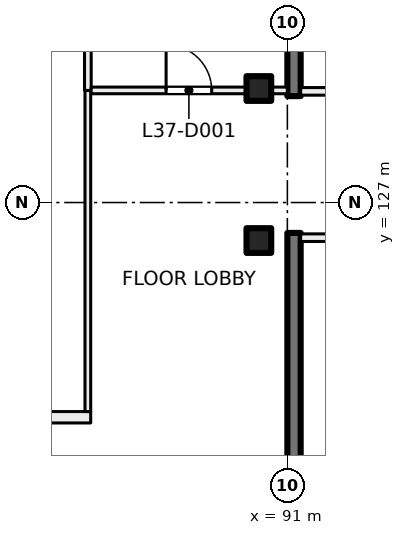
"""IFC4 building model, lengths in metres.
Left out: names, types, materials, properties, quantities, classifications, styles, units other than length and angle.
Written with IfcOpenShell. Run it as: python <this file> out.ifc"""

import sys

from ifc_helpers import new_model, si_unit, direction, frame, frame_2d, origin, origin_2d, place, context, subcontext, project, spatial, rectangle, extrude, element, fill, save


model = new_model("IFC4")
c1 = context("Model", 3, precision=1e-05, world=origin(), true_north=direction((0.0, 1.0)))
c2 = subcontext(c1, "Body", "Model", "MODEL_VIEW")
j1 = project(units=[si_unit("LENGTHUNIT", "METRE"), si_unit("PLANEANGLEUNIT", "RADIAN")], contexts=[c1])
p1 = place(None, origin())
s1 = spatial("IfcSite", under=j1, at=p1, CompositionType="ELEMENT")
p2 = place(p1, origin())
s2 = spatial("IfcBuilding", under=s1, at=p2, CompositionType="ELEMENT")
p3 = place(p2, frame((0.0, 0.0, 158.5)))
s3 = spatial("IfcBuildingStorey", under=s2, at=p3, CompositionType="ELEMENT", Elevation=158.5)
for number, where, z_axis, x_axis in (
    (1, (90.25, 130.0, 0.0), (0.0, 0.0, 1.0), (1.0, 0.0, 0.0)),
    (2, (90.25, 126.0, 0.0), (0.0, 0.0, 1.0), (1.0, 0.0, 0.0)),
):
    element("IfcColumn", number, at=place(p3, frame(where, z_axis=z_axis, x_axis=x_axis)), inside=s3, PredefinedType="COLUMN", context=c2, shape_type="SweptSolid", body=[
        extrude(rectangle(XDim=0.65, YDim=0.65, at=origin_2d()), origin(), (0.0, 0.0, 1.0), 4.0),
    ])
for number, where, z_axis, x_axis in (
    (3, (91.175, 138.45, 0.0), (0.0, 0.0, 1.0), (0.0, -1.0, 0.0)),
    (4, (91.175, 126.2, 0.0), (0.0, 0.0, 1.0), (0.0, -1.0, 0.0)),
):
    element("IfcWall", number, at=place(p3, frame(where, z_axis=z_axis, x_axis=x_axis)), inside=s3, PredefinedType="SHEAR", context=c2, shape_type="SweptSolid", body=[
        extrude(rectangle(XDim=8.65, YDim=0.35, at=frame_2d((4.325, 0.0))), origin(), (0.0, 0.0, 1.0), 4.0),
    ])
p4 = place(p3, frame((95.225, 126.075, 0.0), z_axis=(0.0, 0.0, 1.0), x_axis=(-1.0, 0.0, 0.0)))
e5 = element("IfcWall", 5, at=p4, inside=s3, PredefinedType="PARTITIONING", context=c2, shape_type="SweptSolid", body=[
    extrude(rectangle(XDim=3.875, YDim=0.2, at=frame_2d((1.938, 0.0))), origin(), (0.0, 0.0, 1.0), 3.625),
])
p5 = place(p4, frame((0.3, 0.0, 0.0)))
e6 = element("IfcOpeningElement", 6, at=p5, cuts=e5, PredefinedType="OPENING", context=c2, shape_type="SweptSolid", body=[
    extrude(rectangle(XDim=1.2, YDim=2.1, at=frame_2d((0.6, 1.05))), frame((0.0, 0.11, 0.0), z_axis=(0.0, -1.0, 0.0), x_axis=(1.0, 0.0, 0.0)), (0.0, 0.0, 1.0), 0.22),
])
p6 = place(p3, frame((91.35, 129.925, 0.0), z_axis=(0.0, 0.0, 1.0), x_axis=(1.0, 0.0, 0.0)))
e7 = element("IfcWall", 7, at=p6, inside=s3, PredefinedType="PARTITIONING", context=c2, shape_type="SweptSolid", body=[
    extrude(rectangle(XDim=3.875, YDim=0.2, at=frame_2d((1.938, 0.0))), origin(), (0.0, 0.0, 1.0), 3.625),
])
p7 = place(p6, frame((2.375, 0.0, 0.0)))
e8 = element("IfcOpeningElement", 8, at=p7, cuts=e7, PredefinedType="OPENING", context=c2, shape_type="SweptSolid", body=[
    extrude(rectangle(XDim=1.2, YDim=2.1, at=frame_2d((0.6, 1.05))), frame((0.0, 0.11, 0.0), z_axis=(0.0, -1.0, 0.0), x_axis=(1.0, 0.0, 0.0)), (0.0, 0.0, 1.0), 0.22),
])
p8 = place(p3, frame((50.506, 121.35, 0.0), z_axis=(0.0, 0.0, 1.0), x_axis=(1.0, 0.0, 0.0)))
e9 = element("IfcWall", 9, at=p8, inside=s3, PredefinedType="PARTITIONING", context=c2, shape_type="SweptSolid", body=[
    extrude(rectangle(XDim=35.319, YDim=0.3, at=frame_2d((17.659, 0.0))), origin(), (0.0, 0.0, 1.0), 3.625),
])
p9 = place(p8, frame((25.744, 0.0, 0.0)))
e10 = element("IfcOpeningElement", 10, at=p9, cuts=e9, PredefinedType="OPENING", context=c2, shape_type="SweptSolid", body=[
    extrude(rectangle(XDim=1.0, YDim=2.1, at=frame_2d((0.5, 1.05))), frame((0.0, 0.16, 0.0), z_axis=(0.0, -1.0, 0.0), x_axis=(1.0, 0.0, 0.0)), (0.0, 0.0, 1.0), 0.32),
])
p10 = place(p8, frame((32.094, 0.0, 0.0)))
e11 = element("IfcOpeningElement", 11, at=p10, cuts=e9, PredefinedType="OPENING", context=c2, shape_type="SweptSolid", body=[
    extrude(rectangle(XDim=1.8, YDim=2.1, at=frame_2d((0.9, 1.05))), frame((0.0, 0.16, 0.0), z_axis=(0.0, -1.0, 0.0), x_axis=(1.0, 0.0, 0.0)), (0.0, 0.0, 1.0), 0.32),
])
p11 = place(p8, frame((13.844, 0.0, 0.0)))
e12 = element("IfcOpeningElement", 12, at=p11, cuts=e9, PredefinedType="OPENING", context=c2, shape_type="SweptSolid", body=[
    extrude(rectangle(XDim=0.8, YDim=2.1, at=frame_2d((0.4, 1.05))), frame((0.0, 0.16, 0.0), z_axis=(0.0, -1.0, 0.0), x_axis=(1.0, 0.0, 0.0)), (0.0, 0.0, 1.0), 0.32),
])
p12 = place(p8, frame((9.144, 0.0, 0.0)))
e13 = element("IfcOpeningElement", 13, at=p12, cuts=e9, PredefinedType="OPENING", context=c2, shape_type="SweptSolid", body=[
    extrude(rectangle(XDim=1.2, YDim=2.1, at=frame_2d((0.6, 1.05))), frame((0.0, 0.16, 0.0), z_axis=(0.0, -1.0, 0.0), x_axis=(1.0, 0.0, 0.0)), (0.0, 0.0, 1.0), 0.32),
])
p13 = place(p8, frame((17.844, 0.0, 0.0)))
e14 = element("IfcOpeningElement", 14, at=p13, cuts=e9, PredefinedType="OPENING", context=c2, shape_type="SweptSolid", body=[
    extrude(rectangle(XDim=1.8, YDim=2.1, at=frame_2d((0.9, 1.05))), frame((0.0, 0.16, 0.0), z_axis=(0.0, -1.0, 0.0), x_axis=(1.0, 0.0, 0.0)), (0.0, 0.0, 1.0), 0.32),
])
p14 = place(p8, frame((2.543, 0.0, 0.0)))
e15 = element("IfcOpeningElement", 15, at=p14, cuts=e9, PredefinedType="OPENING", context=c2, shape_type="SweptSolid", body=[
    extrude(rectangle(XDim=1.8, YDim=2.1, at=frame_2d((0.9, 1.05))), frame((0.0, 0.16, 0.0), z_axis=(0.0, -1.0, 0.0), x_axis=(1.0, 0.0, 0.0)), (0.0, 0.0, 1.0), 0.32),
])
p15 = place(p3, frame((85.75, 121.5, 0.0), z_axis=(0.0, 0.0, 1.0), x_axis=(0.0, 1.0, 0.0)))
e16 = element("IfcWall", 16, at=p15, inside=s3, PredefinedType="PARTITIONING", context=c2, shape_type="SweptSolid", body=[
    extrude(rectangle(XDim=8.45, YDim=0.15, at=frame_2d((4.225, 0.0))), origin(), (0.0, 0.0, 1.0), 3.625),
])
p16 = place(p3, frame((85.75, 129.95, 0.0), z_axis=(0.0, 0.0, 1.0), x_axis=(0.0, 1.0, 0.0)))
e17 = element("IfcWall", 17, at=p16, inside=s3, PredefinedType="PARTITIONING", context=c2, shape_type="SweptSolid", body=[
    extrude(rectangle(XDim=8.45, YDim=0.175, at=frame_2d((4.225, 0.0))), origin(), (0.0, 0.0, 1.0), 3.625),
])
p17 = place(p3, frame((85.838, 129.95, 0.0), z_axis=(0.0, 0.0, 1.0), x_axis=(1.0, 0.0, 0.0)))
e18 = element("IfcWall", 18, at=p17, inside=s3, PredefinedType="PARTITIONING", context=c2, shape_type="SweptSolid", body=[
    extrude(rectangle(XDim=5.162, YDim=0.175, at=frame_2d((2.581, 0.0))), origin(), (0.0, 0.0, 1.0), 3.625),
])
p18 = place(p17, frame((1.971, 0.0, 0.0)))
e19 = element("IfcOpeningElement", 19, at=p18, cuts=e18, PredefinedType="OPENING", context=c2, shape_type="SweptSolid", body=[
    extrude(rectangle(XDim=1.2, YDim=2.1, at=frame_2d((0.6, 1.05))), frame((0.0, 0.097, 0.0), z_axis=(0.0, -1.0, 0.0), x_axis=(1.0, 0.0, 0.0)), (0.0, 0.0, 1.0), 0.195),
])
p19 = place(p18, origin())
e20 = element("IfcDoor", 20, at=p19, inside=s3, OperationType="DOUBLE_DOOR_SINGLE_SWING", PredefinedType="DOOR", context=c2, shape_type="SweptSolid", body=[
    extrude(rectangle(XDim=1.2, YDim=2.1, at=frame_2d((0.6, 1.05))), frame((0.0, 0.025, 0.0), z_axis=(0.0, -1.0, 0.0), x_axis=(1.0, 0.0, 0.0)), (0.0, 0.0, 1.0), 0.05),
])
fill(e19, e20)
save(model, sys.argv[1])
